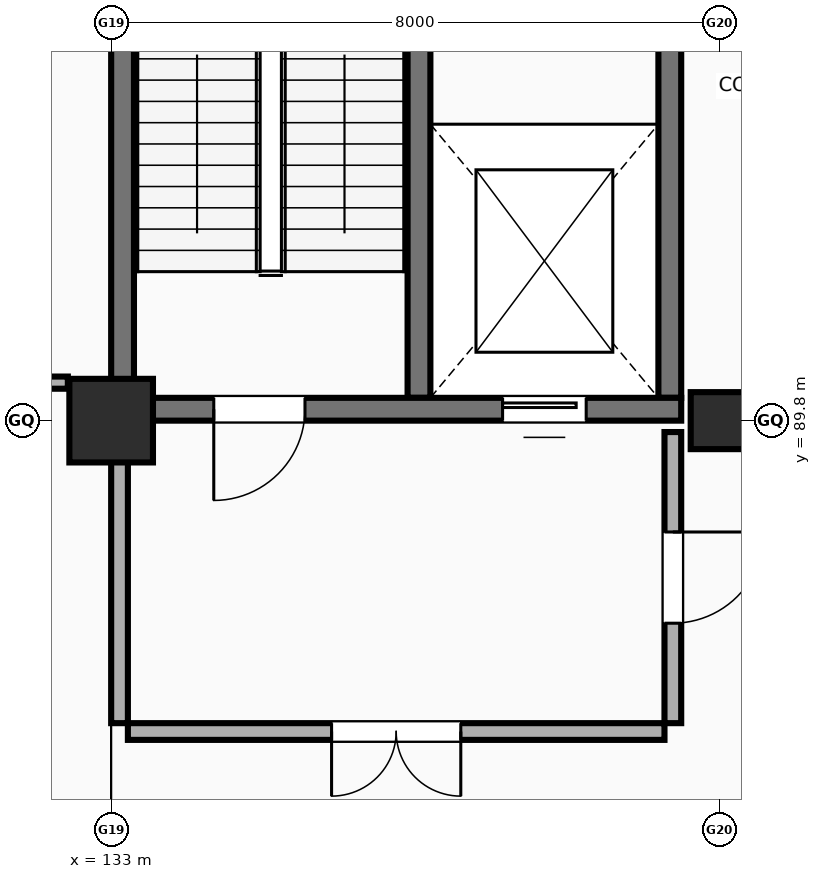
"""IFC4 building model, lengths in metres.
Left out: names, types, materials, properties, quantities, classifications, styles, units other than length and angle.
Written with IfcOpenShell. Run it as: python <this file> out.ifc"""

import sys

from ifc_helpers import new_model, si_unit, direction, frame, frame_2d, origin, origin_2d, place, context, subcontext, project, spatial, rectangle, extrude, element, fill, save


model = new_model("IFC4")
c1 = context("Model", 3, precision=1e-05, world=origin(), true_north=direction((0.0, 1.0)))
c2 = subcontext(c1, "Body", "Model", "MODEL_VIEW")
j1 = project(units=[si_unit("LENGTHUNIT", "METRE"), si_unit("PLANEANGLEUNIT", "RADIAN")], contexts=[c1])
p1 = place(None, origin())
s1 = spatial("IfcSite", under=j1, at=p1, CompositionType="ELEMENT")
p2 = place(p1, origin())
s2 = spatial("IfcBuilding", under=s1, at=p2, CompositionType="ELEMENT")
p3 = place(p2, frame((0.0, 0.0, 9.8)))
s3 = spatial("IfcBuildingStorey", under=s2, at=p3, CompositionType="ELEMENT", Elevation=9.8)
p4 = place(p3, frame((133.0, 89.8, 0.0), z_axis=(0.0, 0.0, 1.0), x_axis=(1.0, 0.0, 0.0)))
e1 = element("IfcColumn", 1, at=p4, inside=s3, PredefinedType="COLUMN", context=c2, shape_type="SweptSolid", body=[
    extrude(rectangle(XDim=1.1, YDim=1.1, at=origin_2d()), origin(), (0.0, 0.0, 1.0), 4.4),
])
p5 = place(p3, frame((141.0, 89.8, 0.0), z_axis=(0.0, 0.0, 1.0), x_axis=(1.0, 0.0, 0.0)))
e2 = element("IfcColumn", 2, at=p5, inside=s3, PredefinedType="COLUMN", context=c2, shape_type="SweptSolid", body=[
    extrude(rectangle(XDim=0.75, YDim=0.75, at=origin_2d()), origin(), (0.0, 0.0, 1.0), 4.4),
])
for number, where, z_axis, x_axis in (
    (3, (133.15, 90.1, 0.0), (0.0, 0.0, 1.0), (0.0, 1.0, 0.0)),
    (4, (140.35, 90.1, 0.0), (0.0, 0.0, 1.0), (0.0, 1.0, 0.0)),
    (5, (137.05, 90.1, 0.0), (0.0, 0.0, 1.0), (0.0, 1.0, 0.0)),
):
    element("IfcWall", number, at=place(p3, frame(where, z_axis=z_axis, x_axis=x_axis)), inside=s3, PredefinedType="SHEAR", context=c2, shape_type="SweptSolid", body=[
        extrude(rectangle(XDim=8.2, YDim=0.3, at=frame_2d((4.1, 0.0))), origin(), (0.0, 0.0, 1.0), 4.4),
    ])
p6 = place(p3, frame((133.0, 89.95, 0.0), z_axis=(0.0, 0.0, 1.0), x_axis=(1.0, 0.0, 0.0)))
e6 = element("IfcWall", 6, at=p6, inside=s3, PredefinedType="SHEAR", context=c2, shape_type="SweptSolid", body=[
    extrude(rectangle(XDim=7.5, YDim=0.3, at=frame_2d((3.75, 0.0))), origin(), (0.0, 0.0, 1.0), 4.4),
])
p7 = place(p6, frame((2.55, 0.0, 0.0), z_axis=(0.0, 0.0, 1.0), x_axis=(-1.0, 0.0, 0.0)))
e7 = element("IfcOpeningElement", 7, at=p7, cuts=e6, PredefinedType="OPENING", context=c2, shape_type="SweptSolid", body=[
    extrude(rectangle(XDim=1.2, YDim=2.15, at=frame_2d((0.6, 1.075))), frame((0.0, 0.16, 0.0), z_axis=(0.0, -1.0, 0.0), x_axis=(1.0, 0.0, 0.0)), (0.0, 0.0, 1.0), 0.32),
])
p8 = place(p6, frame((5.15, 0.0, 0.0)))
e8 = element("IfcOpeningElement", 8, at=p8, cuts=e6, PredefinedType="OPENING", context=c2, shape_type="SweptSolid", body=[
    extrude(rectangle(XDim=1.1, YDim=2.15, at=frame_2d((0.55, 1.075))), frame((0.0, 0.16, 0.0), z_axis=(0.0, -1.0, 0.0), x_axis=(1.0, 0.0, 0.0)), (0.0, 0.0, 1.0), 0.32),
])
p9 = place(p3, frame((133.22, 85.71, 0.0), z_axis=(0.0, 0.0, 1.0), x_axis=(1.0, 0.0, 0.0)))
e9 = element("IfcWall", 9, at=p9, inside=s3, PredefinedType="SOLIDWALL", context=c2, shape_type="SweptSolid", body=[
    extrude(rectangle(XDim=7.06, YDim=0.22, at=frame_2d((3.53, 0.0))), origin(), (0.0, 0.0, 1.0), 3.26),
])
p10 = place(p9, frame((4.38, 0.0, 0.0), z_axis=(0.0, 0.0, 1.0), x_axis=(-1.0, 0.0, 0.0)))
e10 = element("IfcOpeningElement", 10, at=p10, cuts=e9, PredefinedType="OPENING", context=c2, shape_type="SweptSolid", body=[
    extrude(rectangle(XDim=1.7, YDim=2.18, at=frame_2d((0.85, 1.09))), frame((0.0, 0.12, 0.0), z_axis=(0.0, -1.0, 0.0), x_axis=(1.0, 0.0, 0.0)), (0.0, 0.0, 1.0), 0.24),
])
p11 = place(p3, frame((133.11, 85.82, 0.0), z_axis=(0.0, 0.0, 1.0), x_axis=(0.0, 1.0, 0.0)))
e11 = element("IfcWall", 11, at=p11, inside=s3, PredefinedType="SOLIDWALL", context=c2, shape_type="SweptSolid", body=[
    extrude(rectangle(XDim=3.83, YDim=0.22, at=frame_2d((1.915, 0.0))), origin(), (0.0, 0.0, 1.0), 3.26),
])
p12 = place(p3, frame((140.39, 85.82, 0.0), z_axis=(0.0, 0.0, 1.0), x_axis=(0.0, 1.0, 0.0)))
e12 = element("IfcWall", 12, at=p12, inside=s3, PredefinedType="SOLIDWALL", context=c2, shape_type="SweptSolid", body=[
    extrude(rectangle(XDim=3.83, YDim=0.22, at=frame_2d((1.915, 0.0))), origin(), (0.0, 0.0, 1.0), 3.26),
])
p13 = place(p12, frame((2.515, 0.0, 0.0), z_axis=(0.0, 0.0, 1.0), x_axis=(-1.0, 0.0, 0.0)))
e13 = element("IfcOpeningElement", 13, at=p13, cuts=e12, PredefinedType="OPENING", context=c2, shape_type="SweptSolid", body=[
    extrude(rectangle(XDim=1.2, YDim=2.15, at=frame_2d((0.6, 1.075))), frame((0.0, 0.12, 0.0), z_axis=(0.0, -1.0, 0.0), x_axis=(1.0, 0.0, 0.0)), (0.0, 0.0, 1.0), 0.24),
])
p14 = place(p3, frame((125.895, 90.3, 0.0), z_axis=(0.0, 0.0, 1.0), x_axis=(1.0, 0.0, 0.0)))
e14 = element("IfcWall", 14, at=p14, inside=s3, PredefinedType="PARTITIONING", context=c2, shape_type="SweptSolid", body=[
    extrude(rectangle(XDim=6.535, YDim=0.16, at=frame_2d((3.268, 0.0))), origin(), (0.0, 0.0, 1.0), 4.1),
])
p15 = place(p7, origin())
e15 = element("IfcDoor", 15, at=p15, inside=s3, OperationType="SINGLE_SWING_RIGHT", PredefinedType="DOOR", context=c2, shape_type="SweptSolid", body=[
    extrude(rectangle(XDim=1.2, YDim=2.15, at=frame_2d((0.6, 1.075))), frame((0.0, 0.025, 0.0), z_axis=(0.0, -1.0, 0.0), x_axis=(1.0, 0.0, 0.0)), (0.0, 0.0, 1.0), 0.05),
])
fill(e7, e15)
p16 = place(p8, origin())
e16 = element("IfcDoor", 16, at=p16, inside=s3, OperationType="SLIDING_TO_LEFT", PredefinedType="DOOR", context=c2, shape_type="SweptSolid", body=[
    extrude(rectangle(XDim=1.1, YDim=2.15, at=frame_2d((0.55, 1.075))), frame((0.0, 0.025, 0.0), z_axis=(0.0, -1.0, 0.0), x_axis=(1.0, 0.0, 0.0)), (0.0, 0.0, 1.0), 0.05),
])
fill(e8, e16)
p17 = place(p10, origin())
e17 = element("IfcDoor", 17, at=p17, inside=s3, OperationType="DOUBLE_DOOR_SINGLE_SWING", PredefinedType="DOOR", context=c2, shape_type="SweptSolid", body=[
    extrude(rectangle(XDim=1.7, YDim=2.18, at=frame_2d((0.85, 1.09))), frame((0.0, 0.025, 0.0), z_axis=(0.0, -1.0, 0.0), x_axis=(1.0, 0.0, 0.0)), (0.0, 0.0, 1.0), 0.05),
])
fill(e10, e17)
p18 = place(p13, origin())
e18 = element("IfcDoor", 18, at=p18, inside=s3, OperationType="SINGLE_SWING_LEFT", PredefinedType="DOOR", context=c2, shape_type="SweptSolid", body=[
    extrude(rectangle(XDim=1.2, YDim=2.15, at=frame_2d((0.6, 1.075))), frame((0.0, 0.025, 0.0), z_axis=(0.0, -1.0, 0.0), x_axis=(1.0, 0.0, 0.0)), (0.0, 0.0, 1.0), 0.05),
])
fill(e13, e18)
save(model, sys.argv[1])
